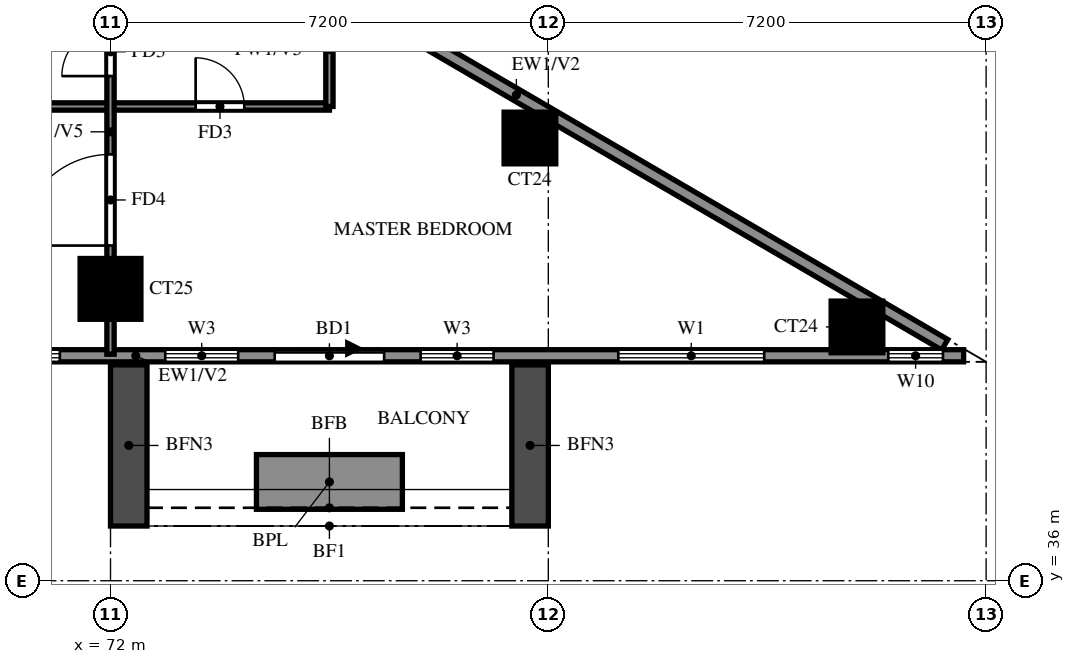
"""IFC4 building model, lengths in metres.
Left out: names, types, materials, properties, quantities, classifications, styles, units other than length and angle.
Written with IfcOpenShell. Run it as: python <this file> out.ifc"""

import sys

from ifc_helpers import new_model, si_unit, direction, frame, frame_2d, origin, origin_2d, place, context, subcontext, project, spatial, rectangle, extrude, source, transform, mapped, element, fill, save


model = new_model("IFC4")
c1 = context("Model", 3, precision=1e-05, world=origin(), true_north=direction((0.0, 1.0)))
c2 = subcontext(c1, "Body", "Model", "MODEL_VIEW")
j1 = project(units=[si_unit("LENGTHUNIT", "METRE"), si_unit("PLANEANGLEUNIT", "RADIAN")], contexts=[c1])
p1 = place(None, origin())
s1 = spatial("IfcSite", under=j1, at=p1, CompositionType="ELEMENT")
p2 = place(p1, origin())
s2 = spatial("IfcBuilding", under=s1, at=p2, CompositionType="ELEMENT")
p3 = place(p2, frame((0.0, 0.0, 150.0)))
s3 = spatial("IfcBuildingStorey", under=s2, at=p3, CompositionType="ELEMENT", Elevation=150.0)
m1 = source(origin(), c2, "Body", "SweptSolid", [
    extrude(rectangle(XDim=0.85, YDim=0.85, at=origin_2d()), origin(), (0.0, 0.0, 1.0), 3.2),
])
p4 = place(p3, frame((84.276, 40.174, 0.0), z_axis=(0.0, 0.0, 1.0), x_axis=(1.0, 0.0, 0.0)))
e1 = element("IfcColumn", 1, at=p4, inside=s3, PredefinedType="COLUMN", context=c2, shape_type="MappedRepresentation", body=[
    mapped(m1, transform((0.0, 0.0, 0.0))),
])
m2 = source(origin(), c2, "Body", "SweptSolid", [
    extrude(rectangle(XDim=1.0, YDim=1.0, at=origin_2d()), origin(), (0.0, 0.0, 1.0), 3.2),
])
p5 = place(p3, frame((72.0, 40.8, 0.0), z_axis=(0.0, 0.0, 1.0), x_axis=(1.0, 0.0, 0.0)))
e2 = element("IfcColumn", 2, at=p5, inside=s3, PredefinedType="COLUMN", context=c2, shape_type="MappedRepresentation", body=[
    mapped(m2, transform((0.0, 0.0, 0.0))),
])
p6 = place(p3, frame((78.898, 43.282, 0.0), z_axis=(0.0, 0.0, 1.0), x_axis=(1.0, 0.0, 0.0)))
e3 = element("IfcColumn", 3, at=p6, inside=s3, PredefinedType="COLUMN", context=c2, shape_type="MappedRepresentation", body=[
    mapped(m1, transform((0.0, 0.0, 0.0))),
])
p7 = place(p3, frame((85.719, 39.881, 0.0), z_axis=(0.0, 0.0, 1.0), x_axis=(-0.86377618652, 0.503875678716, 0.0)))
e4 = element("IfcWall", 4, at=p7, inside=s3, PredefinedType="SOLIDWALL", context=c2, shape_type="SweptSolid", body=[
    extrude(rectangle(XDim=16.311, YDim=0.2, at=frame_2d((8.156, 0.0))), origin(), (0.0, 0.0, 1.0), 3.2),
])
p8 = place(p7, frame((13.326, 0.0, 1.5)))
e5 = element("IfcOpeningElement", 5, at=p8, cuts=e4, PredefinedType="OPENING", context=c2, shape_type="SweptSolid", body=[
    extrude(rectangle(XDim=0.9, YDim=0.9, at=frame_2d((0.45, 0.45))), frame((0.0, 0.11, 0.0), z_axis=(0.0, -1.0, 0.0), x_axis=(1.0, 0.0, 0.0)), (0.0, 0.0, 1.0), 0.22),
])
p9 = place(p3, frame((58.8, 39.7, 0.0), z_axis=(0.0, 0.0, 1.0), x_axis=(1.0, 0.0, 0.0)))
e6 = element("IfcWall", 6, at=p9, inside=s3, PredefinedType="SOLIDWALL", context=c2, shape_type="SweptSolid", body=[
    extrude(rectangle(XDim=27.23, YDim=0.2, at=frame_2d((13.615, 0.0))), origin(), (0.0, 0.0, 1.0), 3.2),
])
p10 = place(p9, frame((15.9, 0.0, 0.0)))
e7 = element("IfcOpeningElement", 7, at=p10, cuts=e6, PredefinedType="OPENING", context=c2, shape_type="SweptSolid", body=[
    extrude(rectangle(XDim=1.8, YDim=2.4, at=frame_2d((0.9, 1.2))), frame((0.0, 0.11, 0.0), z_axis=(0.0, -1.0, 0.0), x_axis=(1.0, 0.0, 0.0)), (0.0, 0.0, 1.0), 0.22),
])
p11 = place(p9, frame((6.833, 0.0, 0.6)))
e8 = element("IfcOpeningElement", 8, at=p11, cuts=e6, PredefinedType="OPENING", context=c2, shape_type="SweptSolid", body=[
    extrude(rectangle(XDim=2.4, YDim=2.4, at=frame_2d((1.2, 1.2))), frame((0.0, 0.11, 0.0), z_axis=(0.0, -1.0, 0.0), x_axis=(1.0, 0.0, 0.0)), (0.0, 0.0, 1.0), 0.22),
])
p12 = place(p9, frame((9.967, 0.0, 0.6)))
e9 = element("IfcOpeningElement", 9, at=p12, cuts=e6, PredefinedType="OPENING", context=c2, shape_type="SweptSolid", body=[
    extrude(rectangle(XDim=2.4, YDim=2.4, at=frame_2d((1.2, 1.2))), frame((0.0, 0.11, 0.0), z_axis=(0.0, -1.0, 0.0), x_axis=(1.0, 0.0, 0.0)), (0.0, 0.0, 1.0), 0.22),
])
p13 = place(p9, frame((14.1, 0.0, 0.6)))
e10 = element("IfcOpeningElement", 10, at=p13, cuts=e6, PredefinedType="OPENING", context=c2, shape_type="SweptSolid", body=[
    extrude(rectangle(XDim=1.2, YDim=2.4, at=frame_2d((0.6, 1.2))), frame((0.0, 0.11, 0.0), z_axis=(0.0, -1.0, 0.0), x_axis=(1.0, 0.0, 0.0)), (0.0, 0.0, 1.0), 0.22),
])
p14 = place(p9, frame((18.3, 0.0, 0.6)))
e11 = element("IfcOpeningElement", 11, at=p14, cuts=e6, PredefinedType="OPENING", context=c2, shape_type="SweptSolid", body=[
    extrude(rectangle(XDim=1.2, YDim=2.4, at=frame_2d((0.6, 1.2))), frame((0.0, 0.11, 0.0), z_axis=(0.0, -1.0, 0.0), x_axis=(1.0, 0.0, 0.0)), (0.0, 0.0, 1.0), 0.22),
])
p15 = place(p9, frame((21.551, 0.0, 0.6)))
e12 = element("IfcOpeningElement", 12, at=p15, cuts=e6, PredefinedType="OPENING", context=c2, shape_type="SweptSolid", body=[
    extrude(rectangle(XDim=2.4, YDim=2.4, at=frame_2d((1.2, 1.2))), frame((0.0, 0.11, 0.0), z_axis=(0.0, -1.0, 0.0), x_axis=(1.0, 0.0, 0.0)), (0.0, 0.0, 1.0), 0.22),
])
p16 = place(p9, frame((25.99, 0.0, 0.6)))
e13 = element("IfcOpeningElement", 13, at=p16, cuts=e6, PredefinedType="OPENING", context=c2, shape_type="SweptSolid", body=[
    extrude(rectangle(XDim=0.9, YDim=2.4, at=frame_2d((0.45, 1.2))), frame((0.0, 0.11, 0.0), z_axis=(0.0, -1.0, 0.0), x_axis=(1.0, 0.0, 0.0)), (0.0, 0.0, 1.0), 0.22),
])
for number, where, z_axis, x_axis in (
    (14, (72.3, 39.55, 0.0), (0.0, 0.0, 1.0), (0.0, -1.0, 0.0)),
    (15, (78.9, 39.55, 0.0), (0.0, 0.0, 1.0), (0.0, -1.0, 0.0)),
):
    element("IfcWall", number, at=place(p3, frame(where, z_axis=z_axis, x_axis=x_axis)), inside=s3, PredefinedType="SOLIDWALL", context=c2, shape_type="SweptSolid", body=[
        extrude(rectangle(XDim=2.65, YDim=0.6, at=frame_2d((1.325, 0.0))), origin(), (0.0, 0.0, 1.0), 2.85),
    ])
p17 = place(p3, frame((74.4, 37.625, 0.0), z_axis=(0.0, 0.0, 1.0), x_axis=(1.0, 0.0, 0.0)))
e16 = element("IfcWall", 16, at=p17, inside=s3, PredefinedType="SOLIDWALL", context=c2, shape_type="SweptSolid", body=[
    extrude(rectangle(XDim=2.4, YDim=0.9, at=frame_2d((1.2, 0.0))), origin(), (0.0, 0.0, 1.0), 0.9),
])
p18 = place(p3, frame((60.0, 43.8, 0.0), z_axis=(0.0, 0.0, 1.0), x_axis=(1.0, 0.0, 0.0)))
e17 = element("IfcWall", 17, at=p18, inside=s3, PredefinedType="PARTITIONING", context=c2, shape_type="SweptSolid", body=[
    extrude(rectangle(XDim=15.6, YDim=0.12, at=frame_2d((7.8, 0.0))), origin(), (0.0, 0.0, 1.0), 3.2),
])
p19 = place(p18, frame((7.65, 0.0, 0.0)))
e18 = element("IfcOpeningElement", 18, at=p19, cuts=e17, PredefinedType="OPENING", context=c2, shape_type="SweptSolid", body=[
    extrude(rectangle(XDim=1.5, YDim=2.1, at=frame_2d((0.75, 1.05))), frame((0.0, 0.07, 0.0), z_axis=(0.0, -1.0, 0.0), x_axis=(1.0, 0.0, 0.0)), (0.0, 0.0, 1.0), 0.14),
])
p20 = place(p18, frame((1.95, 0.0, 0.0)))
e19 = element("IfcOpeningElement", 19, at=p20, cuts=e17, PredefinedType="OPENING", context=c2, shape_type="SweptSolid", body=[
    extrude(rectangle(XDim=0.9, YDim=2.1, at=frame_2d((0.45, 1.05))), frame((0.0, 0.07, 0.0), z_axis=(0.0, -1.0, 0.0), x_axis=(1.0, 0.0, 0.0)), (0.0, 0.0, 1.0), 0.14),
])
p21 = place(p18, frame((13.4, 0.0, 0.0)))
e20 = element("IfcOpeningElement", 20, at=p21, cuts=e17, PredefinedType="OPENING", context=c2, shape_type="SweptSolid", body=[
    extrude(rectangle(XDim=0.8, YDim=2.1, at=frame_2d((0.4, 1.05))), frame((0.0, 0.07, 0.0), z_axis=(0.0, -1.0, 0.0), x_axis=(1.0, 0.0, 0.0)), (0.0, 0.0, 1.0), 0.14),
])
p22 = place(p3, frame((72.0, 39.725, 0.0), z_axis=(0.0, 0.0, 1.0), x_axis=(0.0, 1.0, 0.0)))
e21 = element("IfcWall", 21, at=p22, inside=s3, PredefinedType="PARTITIONING", context=c2, shape_type="SweptSolid", body=[
    extrude(rectangle(XDim=8.13, YDim=0.12, at=frame_2d((4.065, 0.0))), origin(), (0.0, 0.0, 1.0), 2.3),
])
p23 = place(p22, frame((1.788, 0.0, 0.0)))
e22 = element("IfcOpeningElement", 22, at=p23, cuts=e21, PredefinedType="OPENING", context=c2, shape_type="SweptSolid", body=[
    extrude(rectangle(XDim=1.5, YDim=2.1, at=frame_2d((0.75, 1.05))), frame((0.0, 0.07, 0.0), z_axis=(0.0, -1.0, 0.0), x_axis=(1.0, 0.0, 0.0)), (0.0, 0.0, 1.0), 0.14),
])
p24 = place(p22, frame((4.575, 0.0, 0.0)))
e23 = element("IfcOpeningElement", 23, at=p24, cuts=e21, PredefinedType="OPENING", context=c2, shape_type="SweptSolid", body=[
    extrude(rectangle(XDim=0.8, YDim=2.1, at=frame_2d((0.4, 1.05))), frame((0.0, 0.07, 0.0), z_axis=(0.0, -1.0, 0.0), x_axis=(1.0, 0.0, 0.0)), (0.0, 0.0, 1.0), 0.14),
])
p25 = place(p3, frame((75.6, 43.8, 0.0), z_axis=(0.0, 0.0, 1.0), x_axis=(0.0, 1.0, 0.0)))
e24 = element("IfcWall", 24, at=p25, inside=s3, PredefinedType="PARTITIONING", context=c2, shape_type="SweptSolid", body=[
    extrude(rectangle(XDim=1.868, YDim=0.12, at=frame_2d((0.934, 0.0))), origin(), (0.0, 0.0, 1.0), 2.3),
])
p26 = place(p10, origin())
e25 = element("IfcDoor", 25, at=p26, inside=s3, OperationType="DOUBLE_DOOR_SLIDING", PredefinedType="DOOR", context=c2, shape_type="SweptSolid", body=[
    extrude(rectangle(XDim=1.8, YDim=2.4, at=frame_2d((0.9, 1.2))), frame((0.0, 0.025, 0.0), z_axis=(0.0, -1.0, 0.0), x_axis=(1.0, 0.0, 0.0)), (0.0, 0.0, 1.0), 0.05),
])
fill(e7, e25)
p27 = place(p12, origin())
e26 = element("IfcWindow", 26, at=p27, inside=s3, PartitioningType="DOUBLE_PANEL_VERTICAL", PredefinedType="WINDOW", context=c2, shape_type="SweptSolid", body=[
    extrude(rectangle(XDim=2.4, YDim=2.4, at=frame_2d((1.2, 1.2))), frame((0.0, 0.03, 0.0), z_axis=(0.0, -1.0, 0.0), x_axis=(1.0, 0.0, 0.0)), (0.0, 0.0, 1.0), 0.06),
])
fill(e9, e26)
p28 = place(p13, origin())
e27 = element("IfcWindow", 27, at=p28, inside=s3, PartitioningType="SINGLE_PANEL", PredefinedType="WINDOW", context=c2, shape_type="SweptSolid", body=[
    extrude(rectangle(XDim=1.2, YDim=2.4, at=frame_2d((0.6, 1.2))), frame((0.0, 0.03, 0.0), z_axis=(0.0, -1.0, 0.0), x_axis=(1.0, 0.0, 0.0)), (0.0, 0.0, 1.0), 0.06),
])
fill(e10, e27)
p29 = place(p14, origin())
e28 = element("IfcWindow", 28, at=p29, inside=s3, PartitioningType="SINGLE_PANEL", PredefinedType="WINDOW", context=c2, shape_type="SweptSolid", body=[
    extrude(rectangle(XDim=1.2, YDim=2.4, at=frame_2d((0.6, 1.2))), frame((0.0, 0.03, 0.0), z_axis=(0.0, -1.0, 0.0), x_axis=(1.0, 0.0, 0.0)), (0.0, 0.0, 1.0), 0.06),
])
fill(e11, e28)
p30 = place(p15, origin())
e29 = element("IfcWindow", 29, at=p30, inside=s3, PartitioningType="DOUBLE_PANEL_VERTICAL", PredefinedType="WINDOW", context=c2, shape_type="SweptSolid", body=[
    extrude(rectangle(XDim=2.4, YDim=2.4, at=frame_2d((1.2, 1.2))), frame((0.0, 0.03, 0.0), z_axis=(0.0, -1.0, 0.0), x_axis=(1.0, 0.0, 0.0)), (0.0, 0.0, 1.0), 0.06),
])
fill(e12, e29)
p31 = place(p16, origin())
e30 = element("IfcWindow", 30, at=p31, inside=s3, PartitioningType="SINGLE_PANEL", PredefinedType="WINDOW", context=c2, shape_type="SweptSolid", body=[
    extrude(rectangle(XDim=0.9, YDim=2.4, at=frame_2d((0.45, 1.2))), frame((0.0, 0.03, 0.0), z_axis=(0.0, -1.0, 0.0), x_axis=(1.0, 0.0, 0.0)), (0.0, 0.0, 1.0), 0.06),
])
fill(e13, e30)
p32 = place(p23, origin())
e31 = element("IfcDoor", 31, at=p32, inside=s3, OperationType="SINGLE_SWING_LEFT", PredefinedType="DOOR", context=c2, shape_type="SweptSolid", body=[
    extrude(rectangle(XDim=1.5, YDim=2.1, at=frame_2d((0.75, 1.05))), frame((0.0, 0.025, 0.0), z_axis=(0.0, -1.0, 0.0), x_axis=(1.0, 0.0, 0.0)), (0.0, 0.0, 1.0), 0.05),
])
fill(e22, e31)
p33 = place(p24, origin())
e32 = element("IfcDoor", 32, at=p33, inside=s3, OperationType="SINGLE_SWING_LEFT", PredefinedType="DOOR", context=c2, shape_type="SweptSolid", body=[
    extrude(rectangle(XDim=0.8, YDim=2.1, at=frame_2d((0.4, 1.05))), frame((0.0, 0.025, 0.0), z_axis=(0.0, -1.0, 0.0), x_axis=(1.0, 0.0, 0.0)), (0.0, 0.0, 1.0), 0.05),
])
fill(e23, e32)
p34 = place(p21, origin())
e33 = element("IfcDoor", 33, at=p34, inside=s3, OperationType="SINGLE_SWING_LEFT", PredefinedType="DOOR", context=c2, shape_type="SweptSolid", body=[
    extrude(rectangle(XDim=0.8, YDim=2.1, at=frame_2d((0.4, 1.05))), frame((0.0, 0.025, 0.0), z_axis=(0.0, -1.0, 0.0), x_axis=(1.0, 0.0, 0.0)), (0.0, 0.0, 1.0), 0.05),
])
fill(e20, e33)
save(model, sys.argv[1])
